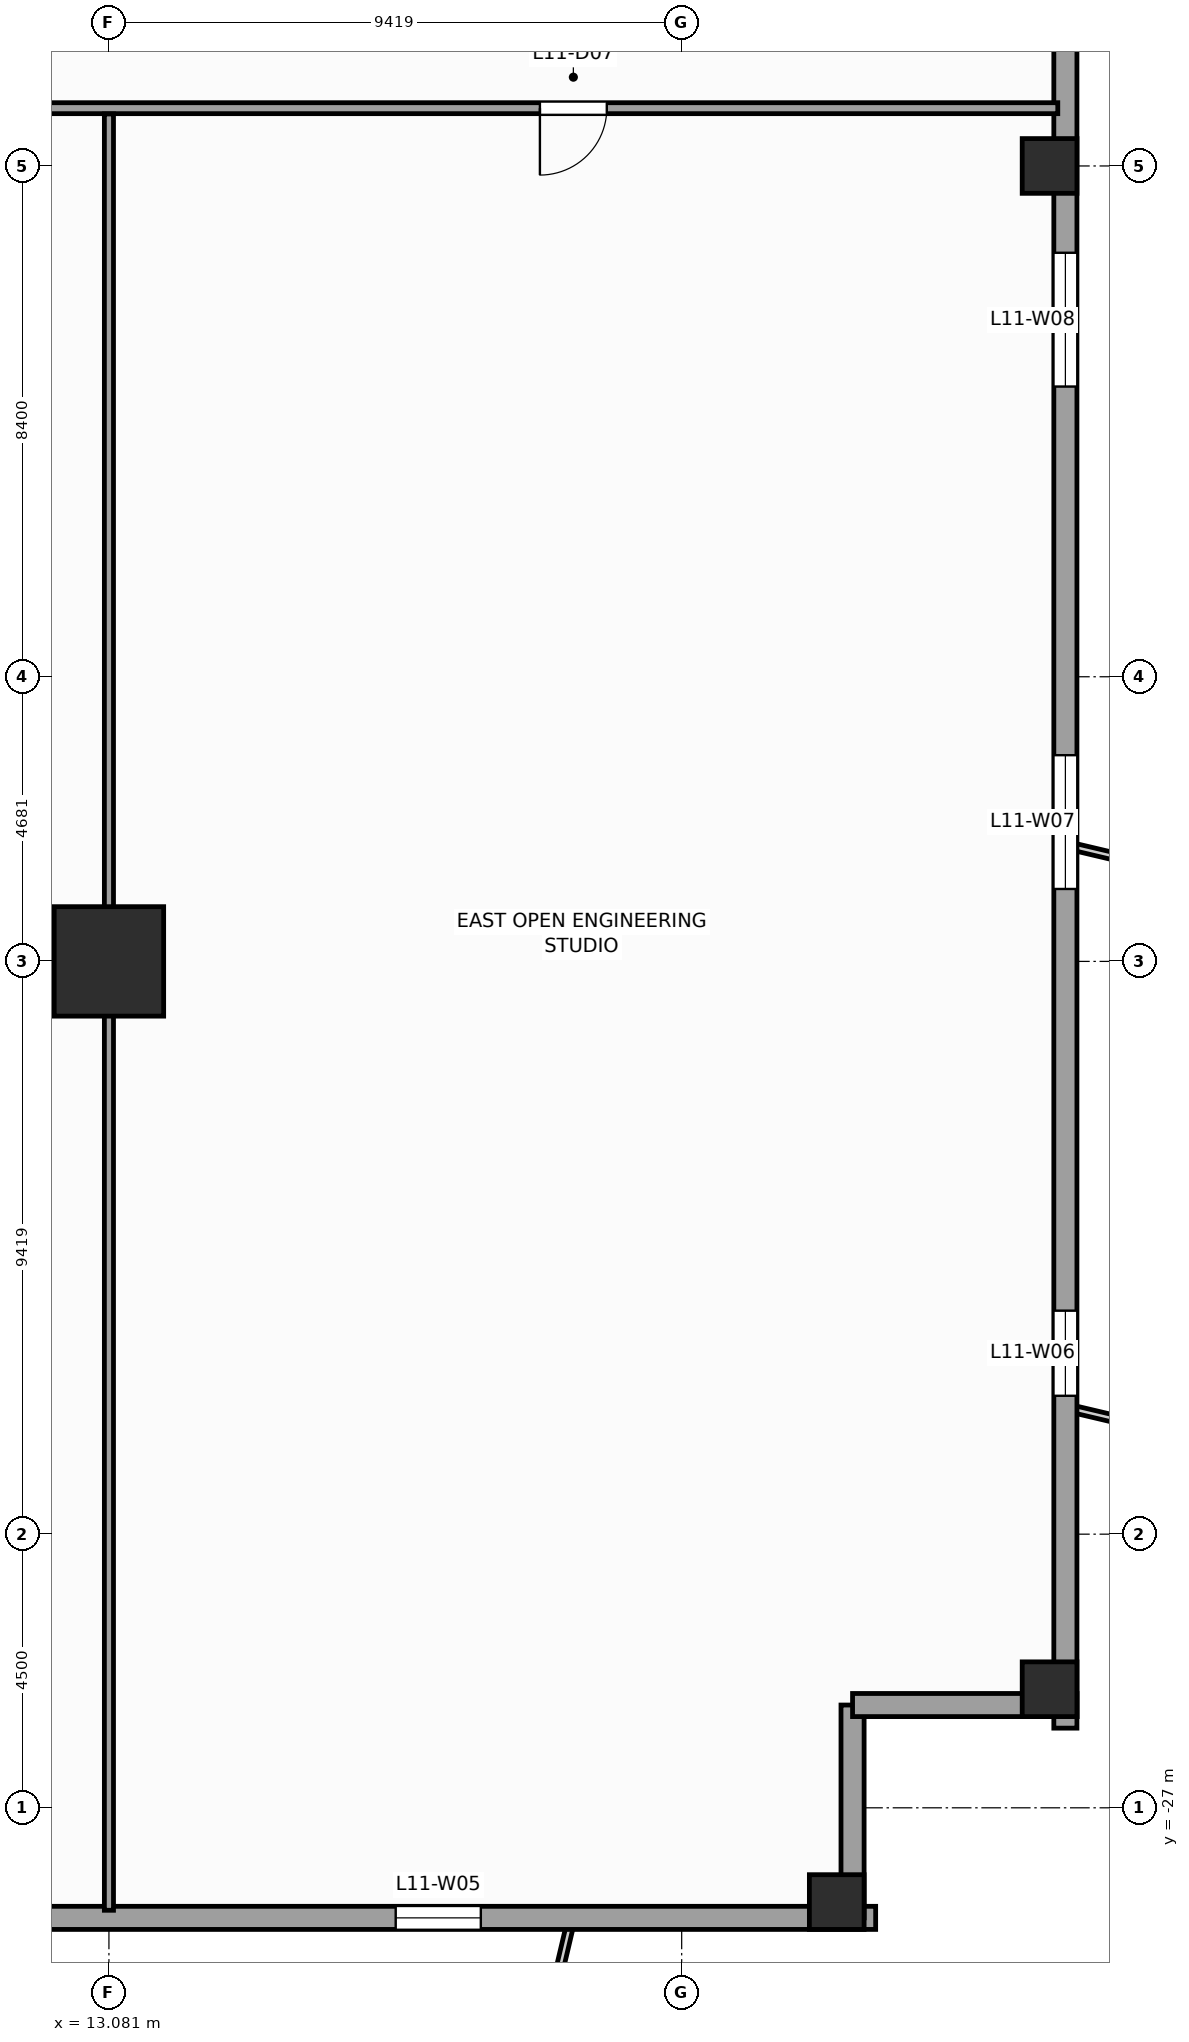
"""IFC4 building model, lengths in metres.
Left out: names, types, materials, properties, quantities, classifications, styles, units other than length and angle.
Written with IfcOpenShell. Run it as: python <this file> out.ifc"""

import sys

from ifc_helpers import new_model, si_unit, direction, frame, frame_2d, origin, origin_2d, place, context, subcontext, project, spatial, rectangle, extrude, source, transform, mapped, element, fill, save


model = new_model("IFC4")
c1 = context("Model", 3, precision=1e-05, world=origin(), true_north=direction((0.0, 1.0)))
c2 = subcontext(c1, "Body", "Model", "MODEL_VIEW")
j1 = project(units=[si_unit("LENGTHUNIT", "METRE"), si_unit("PLANEANGLEUNIT", "RADIAN")], contexts=[c1])
p1 = place(None, origin())
s1 = spatial("IfcSite", under=j1, at=p1, CompositionType="ELEMENT")
p2 = place(p1, origin())
s2 = spatial("IfcBuilding", under=s1, at=p2, CompositionType="ELEMENT")
p3 = place(p2, frame((0.0, 0.0, 50.0)))
s3 = spatial("IfcBuildingStorey", under=s2, at=p3, CompositionType="ELEMENT", Elevation=50.0)
m1 = source(origin(), c2, "Body", "SweptSolid", [
    extrude(rectangle(XDim=1.8, YDim=1.8, at=origin_2d()), origin(), (0.0, 0.0, 1.0), 4.0),
])
p4 = place(p3, frame((13.081, -13.081, 0.0), z_axis=(0.0, 0.0, 1.0), x_axis=(1.0, 0.0, 0.0)))
e1 = element("IfcColumn", 1, at=p4, inside=s3, PredefinedType="COLUMN", context=c2, shape_type="MappedRepresentation", body=[
    mapped(m1, transform((0.0, 0.0, 0.0), scale=1.0)),
])
m2 = source(origin(), c2, "Body", "SweptSolid", [
    extrude(rectangle(XDim=0.9, YDim=0.9, at=origin_2d()), origin(), (0.0, 0.0, 1.0), 4.0),
])
for number, where, z_axis, x_axis in (
    (2, (25.05, -28.55, 0.0), (0.0, 0.0, 1.0), (1.0, 0.0, 0.0)),
    (3, (28.55, -25.05, 0.0), (0.0, 0.0, 1.0), (1.0, 0.0, 0.0)),
    (4, (28.55, 0.0, 0.0), (0.0, 0.0, 1.0), (1.0, 0.0, 0.0)),
):
    element("IfcColumn", number, at=place(p3, frame(where, z_axis=z_axis, x_axis=x_axis)), inside=s3, PredefinedType="COLUMN", context=c2, shape_type="MappedRepresentation", body=[
        mapped(m2, transform((0.0, 0.0, 0.0), scale=1.0)),
    ])
p5 = place(p3, frame((-25.69, -28.81, 0.0), z_axis=(0.0, 0.0, 1.0), x_axis=(1.0, 0.0, 0.0)))
e5 = element("IfcWall", 5, at=p5, inside=s3, PredefinedType="STANDARD", context=c2, shape_type="SweptSolid", body=[
    extrude(rectangle(XDim=51.38, YDim=0.38, at=frame_2d((25.69, 0.0))), origin(), (0.0, 0.0, 1.0), 3.12),
])
p6 = place(p5, frame((29.915, 0.0, 0.0)))
e6 = element("IfcOpeningElement", 6, at=p6, cuts=e5, PredefinedType="OPENING", context=c2, shape_type="SweptSolid", body=[
    extrude(rectangle(XDim=1.05, YDim=2.25, at=frame_2d((0.525, 1.125))), frame((0.0, 0.2, 0.0), z_axis=(0.0, -1.0, 0.0), x_axis=(1.0, 0.0, 0.0)), (0.0, 0.0, 1.0), 0.4),
])
p7 = place(p5, frame((5.466, 0.0, 0.49)))
e7 = element("IfcOpeningElement", 7, at=p7, cuts=e5, PredefinedType="OPENING", context=c2, shape_type="SweptSolid", body=[
    extrude(rectangle(XDim=1.4, YDim=2.4, at=frame_2d((0.7, 1.2))), frame((0.0, 0.2, 0.0), z_axis=(0.0, -1.0, 0.0), x_axis=(1.0, 0.0, 0.0)), (0.0, 0.0, 1.0), 0.4),
])
p8 = place(p5, frame((13.8, 0.0, 0.49)))
e8 = element("IfcOpeningElement", 8, at=p8, cuts=e5, PredefinedType="OPENING", context=c2, shape_type="SweptSolid", body=[
    extrude(rectangle(XDim=2.2, YDim=2.4, at=frame_2d((1.1, 1.2))), frame((0.0, 0.2, 0.0), z_axis=(0.0, -1.0, 0.0), x_axis=(1.0, 0.0, 0.0)), (0.0, 0.0, 1.0), 0.4),
])
p9 = place(p5, frame((22.062, 0.0, 0.49)))
e9 = element("IfcOpeningElement", 9, at=p9, cuts=e5, PredefinedType="OPENING", context=c2, shape_type="SweptSolid", body=[
    extrude(rectangle(XDim=2.2, YDim=2.4, at=frame_2d((1.1, 1.2))), frame((0.0, 0.2, 0.0), z_axis=(0.0, -1.0, 0.0), x_axis=(1.0, 0.0, 0.0)), (0.0, 0.0, 1.0), 0.4),
])
p10 = place(p5, frame((33.838, 0.0, 0.49)))
e10 = element("IfcOpeningElement", 10, at=p10, cuts=e5, PredefinedType="OPENING", context=c2, shape_type="SweptSolid", body=[
    extrude(rectangle(XDim=2.2, YDim=2.4, at=frame_2d((1.1, 1.2))), frame((0.0, 0.2, 0.0), z_axis=(0.0, -1.0, 0.0), x_axis=(1.0, 0.0, 0.0)), (0.0, 0.0, 1.0), 0.4),
])
p11 = place(p5, frame((43.487, 0.0, 0.49)))
e11 = element("IfcOpeningElement", 11, at=p11, cuts=e5, PredefinedType="OPENING", context=c2, shape_type="SweptSolid", body=[
    extrude(rectangle(XDim=1.4, YDim=2.4, at=frame_2d((0.7, 1.2))), frame((0.0, 0.2, 0.0), z_axis=(0.0, -1.0, 0.0), x_axis=(1.0, 0.0, 0.0)), (0.0, 0.0, 1.0), 0.4),
])
p12 = place(p3, frame((25.31, -28.81, 0.0), z_axis=(0.0, 0.0, 1.0), x_axis=(0.0, 1.0, 0.0)))
e12 = element("IfcWall", 12, at=p12, inside=s3, PredefinedType="STANDARD", context=c2, shape_type="SweptSolid", body=[
    extrude(rectangle(XDim=3.5, YDim=0.38, at=frame_2d((1.75, 0.0))), origin(), (0.0, 0.0, 1.0), 3.72),
])
p13 = place(p3, frame((25.31, -25.31, 0.0), z_axis=(0.0, 0.0, 1.0), x_axis=(1.0, 0.0, 0.0)))
e13 = element("IfcWall", 13, at=p13, inside=s3, PredefinedType="STANDARD", context=c2, shape_type="SweptSolid", body=[
    extrude(rectangle(XDim=3.69, YDim=0.38, at=frame_2d((1.845, 0.0))), origin(), (0.0, 0.0, 1.0), 3.72),
])
p14 = place(p3, frame((28.81, -25.69, 0.0), z_axis=(0.0, 0.0, 1.0), x_axis=(0.0, 1.0, 0.0)))
e14 = element("IfcWall", 14, at=p14, inside=s3, PredefinedType="STANDARD", context=c2, shape_type="SweptSolid", body=[
    extrude(rectangle(XDim=51.38, YDim=0.38, at=frame_2d((25.69, 0.0))), origin(), (0.0, 0.0, 1.0), 3.12),
])
p15 = place(p14, frame((5.466, 0.0, 0.49)))
e15 = element("IfcOpeningElement", 15, at=p15, cuts=e14, PredefinedType="OPENING", context=c2, shape_type="SweptSolid", body=[
    extrude(rectangle(XDim=1.4, YDim=2.4, at=frame_2d((0.7, 1.2))), frame((0.0, 0.2, 0.0), z_axis=(0.0, -1.0, 0.0), x_axis=(1.0, 0.0, 0.0)), (0.0, 0.0, 1.0), 0.4),
])
p16 = place(p14, frame((13.8, 0.0, 0.49)))
e16 = element("IfcOpeningElement", 16, at=p16, cuts=e14, PredefinedType="OPENING", context=c2, shape_type="SweptSolid", body=[
    extrude(rectangle(XDim=2.2, YDim=2.4, at=frame_2d((1.1, 1.2))), frame((0.0, 0.2, 0.0), z_axis=(0.0, -1.0, 0.0), x_axis=(1.0, 0.0, 0.0)), (0.0, 0.0, 1.0), 0.4),
])
p17 = place(p14, frame((22.062, 0.0, 0.49)))
e17 = element("IfcOpeningElement", 17, at=p17, cuts=e14, PredefinedType="OPENING", context=c2, shape_type="SweptSolid", body=[
    extrude(rectangle(XDim=2.2, YDim=2.4, at=frame_2d((1.1, 1.2))), frame((0.0, 0.2, 0.0), z_axis=(0.0, -1.0, 0.0), x_axis=(1.0, 0.0, 0.0)), (0.0, 0.0, 1.0), 0.4),
])
p18 = place(p14, frame((33.838, 0.0, 0.49)))
e18 = element("IfcOpeningElement", 18, at=p18, cuts=e14, PredefinedType="OPENING", context=c2, shape_type="SweptSolid", body=[
    extrude(rectangle(XDim=2.2, YDim=2.4, at=frame_2d((1.1, 1.2))), frame((0.0, 0.2, 0.0), z_axis=(0.0, -1.0, 0.0), x_axis=(1.0, 0.0, 0.0)), (0.0, 0.0, 1.0), 0.4),
])
p19 = place(p14, frame((43.487, 0.0, 0.49)))
e19 = element("IfcOpeningElement", 19, at=p19, cuts=e14, PredefinedType="OPENING", context=c2, shape_type="SweptSolid", body=[
    extrude(rectangle(XDim=1.4, YDim=2.4, at=frame_2d((0.7, 1.2))), frame((0.0, 0.2, 0.0), z_axis=(0.0, -1.0, 0.0), x_axis=(1.0, 0.0, 0.0)), (0.0, 0.0, 1.0), 0.4),
])
p20 = place(p3, frame((10.7, 0.95, 0.0), z_axis=(0.0, 0.0, 1.0), x_axis=(1.0, 0.0, 0.0)))
e20 = element("IfcWall", 20, at=p20, inside=s3, PredefinedType="PARTITIONING", context=c2, shape_type="SweptSolid", body=[
    extrude(rectangle(XDim=17.985, YDim=0.18, at=frame_2d((8.993, 0.0))), origin(), (0.0, 0.0, 1.0), 3.72),
])
p21 = place(p20, frame((9.469, 0.0, 0.0)))
e21 = element("IfcOpeningElement", 21, at=p21, cuts=e20, PredefinedType="OPENING", context=c2, shape_type="SweptSolid", body=[
    extrude(rectangle(XDim=1.1, YDim=2.2, at=frame_2d((0.55, 1.1))), frame((0.0, 0.1, 0.0), z_axis=(0.0, -1.0, 0.0), x_axis=(1.0, 0.0, 0.0)), (0.0, 0.0, 1.0), 0.2),
])
p22 = place(p3, frame((13.081, -28.685, 0.0), z_axis=(0.0, 0.0, 1.0), x_axis=(0.0, 1.0, 0.0)))
e22 = element("IfcWall", 22, at=p22, inside=s3, PredefinedType="PARTITIONING", context=c2, shape_type="SweptSolid", body=[
    extrude(rectangle(XDim=29.54, YDim=0.15, at=frame_2d((14.77, 0.0))), origin(), (0.0, 0.0, 1.0), 2.712),
])
m3 = source(origin(), c2, "Body", "SweptSolid", [
    extrude(rectangle(XDim=1.4, YDim=2.4, at=frame_2d((0.7, 1.2))), frame((0.0, 0.03, 0.0), z_axis=(0.0, -1.0, 0.0), x_axis=(1.0, 0.0, 0.0)), (0.0, 0.0, 1.0), 0.06),
])
p23 = place(p11, origin())
e23 = element("IfcWindow", 23, at=p23, inside=s3, PartitioningType="SINGLE_PANEL", PredefinedType="WINDOW", context=c2, shape_type="MappedRepresentation", body=[
    mapped(m3, transform((0.0, 0.0, 0.0), scale=1.0)),
])
fill(e11, e23)
p24 = place(p15, origin())
e24 = element("IfcWindow", 24, at=p24, inside=s3, PartitioningType="SINGLE_PANEL", PredefinedType="WINDOW", context=c2, shape_type="MappedRepresentation", body=[
    mapped(m3, transform((0.0, 0.0, 0.0), scale=1.0)),
])
fill(e15, e24)
m4 = source(origin(), c2, "Body", "SweptSolid", [
    extrude(rectangle(XDim=2.2, YDim=2.4, at=frame_2d((1.1, 1.2))), frame((0.0, 0.03, 0.0), z_axis=(0.0, -1.0, 0.0), x_axis=(1.0, 0.0, 0.0)), (0.0, 0.0, 1.0), 0.06),
])
p25 = place(p16, origin())
e25 = element("IfcWindow", 25, at=p25, inside=s3, PartitioningType="SINGLE_PANEL", PredefinedType="WINDOW", context=c2, shape_type="MappedRepresentation", body=[
    mapped(m4, transform((0.0, 0.0, 0.0), scale=1.0)),
])
fill(e16, e25)
p26 = place(p17, origin())
e26 = element("IfcWindow", 26, at=p26, inside=s3, PartitioningType="SINGLE_PANEL", PredefinedType="WINDOW", context=c2, shape_type="MappedRepresentation", body=[
    mapped(m4, transform((0.0, 0.0, 0.0), scale=1.0)),
])
fill(e17, e26)
m5 = source(origin(), c2, "Body", "SweptSolid", [
    extrude(rectangle(XDim=1.1, YDim=2.2, at=frame_2d((0.55, 1.1))), frame((0.0, 0.025, 0.0), z_axis=(0.0, -1.0, 0.0), x_axis=(1.0, 0.0, 0.0)), (0.0, 0.0, 1.0), 0.05),
])
p27 = place(p21, frame((1.1, 0.0, 0.0), z_axis=(0.0, 0.0, 1.0), x_axis=(-1.0, 0.0, 0.0)))
e27 = element("IfcDoor", 27, at=p27, inside=s3, OperationType="SINGLE_SWING_LEFT", PredefinedType="DOOR", context=c2, shape_type="MappedRepresentation", body=[
    mapped(m5, transform((0.0, 0.0, 0.0), scale=1.0)),
])
fill(e21, e27)
save(model, sys.argv[1])
